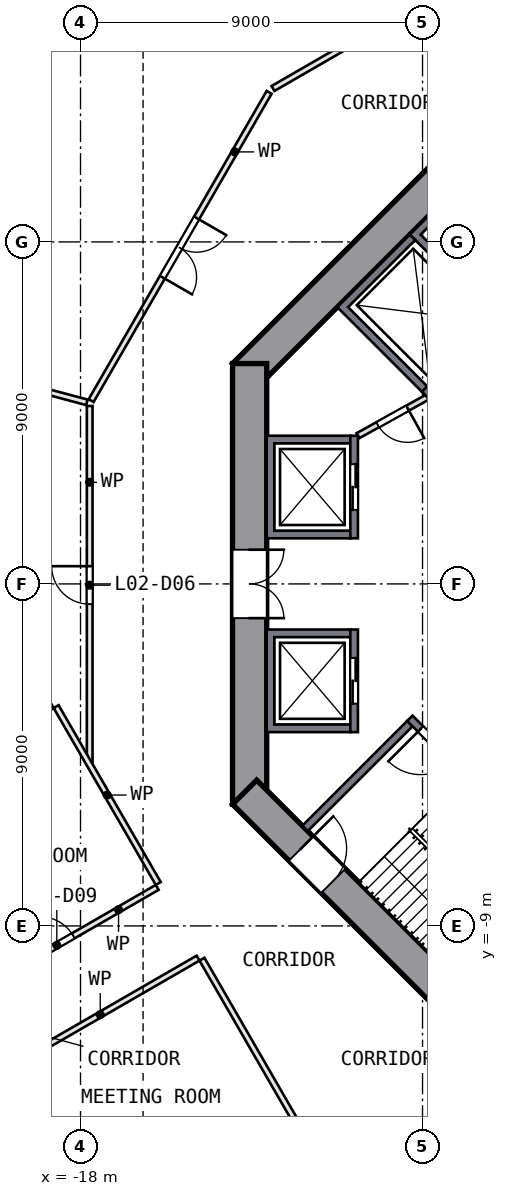
"""IFC4 building model, lengths in metres.
Left out: names, types, materials, properties, quantities, classifications, styles, units other than length and angle.
Written with IfcOpenShell. Run it as: python <this file> out.ifc"""

import sys

from ifc_helpers import new_model, si_unit, direction, frame, frame_2d, origin, place, context, subcontext, project, spatial, polyline, rectangle, outline, extrude, element, fill, save


model = new_model("IFC4")
c1 = context("Model", 3, precision=1e-05, world=origin(), true_north=direction((0.0, 1.0)))
c2 = subcontext(c1, "Body", "Model", "MODEL_VIEW")
j1 = project(units=[si_unit("LENGTHUNIT", "METRE"), si_unit("PLANEANGLEUNIT", "RADIAN")], contexts=[c1])
p1 = place(None, origin())
s1 = spatial("IfcSite", under=j1, at=p1, CompositionType="ELEMENT")
p2 = place(p1, origin())
s2 = spatial("IfcBuilding", under=s1, at=p2, CompositionType="ELEMENT")
p3 = place(p2, frame((0.0, 0.0, 14.0)))
s3 = spatial("IfcBuildingStorey", under=s2, at=p3, CompositionType="ELEMENT", Elevation=14.0)
p4 = place(p3, frame((-5.481, 13.682, 0.0), z_axis=(0.0, 0.0, 1.0), x_axis=(-0.707106781, -0.707106781, 0.0)))
e1 = element("IfcWall", 1, at=p4, inside=s3, PredefinedType="SHEAR", context=c2, shape_type="SweptSolid", body=[
    extrude(rectangle(XDim=11.598, YDim=0.9, at=frame_2d((5.799, 0.0))), origin(), (0.0, 0.0, 1.0), 5.0),
])
p5 = place(p3, frame((-13.55, 5.799, 0.0), z_axis=(0.0, 0.0, 1.0), x_axis=(0.0, -1.0, 0.0)))
e2 = element("IfcWall", 2, at=p5, inside=s3, PredefinedType="SHEAR", context=c2, shape_type="SweptSolid", body=[
    extrude(rectangle(XDim=11.598, YDim=0.9, at=frame_2d((5.799, 0.0))), origin(), (0.0, 0.0, 1.0), 5.0),
])
p6 = place(p5, frame((4.899, 0.0, 0.0)))
e3 = element("IfcOpeningElement", 3, at=p6, cuts=e2, PredefinedType="OPENING", context=c2, shape_type="SweptSolid", body=[
    extrude(rectangle(XDim=1.8, YDim=2.1, at=frame_2d((0.9, 1.05))), frame((0.0, 0.46, 0.0), z_axis=(0.0, -1.0, 0.0), x_axis=(1.0, 0.0, 0.0)), (0.0, 0.0, 1.0), 0.92),
])
p7 = place(p3, frame((-13.682, -5.481, 0.0), z_axis=(0.0, 0.0, 1.0), x_axis=(0.707106781, -0.707106781, 0.0)))
e4 = element("IfcWall", 4, at=p7, inside=s3, PredefinedType="SHEAR", context=c2, shape_type="SweptSolid", body=[
    extrude(rectangle(XDim=11.598, YDim=0.9, at=frame_2d((5.799, 0.0))), origin(), (0.0, 0.0, 1.0), 5.0),
])
p8 = place(p7, frame((2.099, 0.0, 0.0)))
e5 = element("IfcOpeningElement", 5, at=p8, cuts=e4, PredefinedType="OPENING", context=c2, shape_type="SweptSolid", body=[
    extrude(rectangle(XDim=1.2, YDim=2.1, at=frame_2d((0.6, 1.05))), frame((0.0, 0.46, 0.0), z_axis=(0.0, -1.0, 0.0), x_axis=(1.0, 0.0, 0.0)), (0.0, 0.0, 1.0), 0.92),
])
p9 = place(p3, frame((-17.777, 17.586, 0.0), z_axis=(0.0, 0.0, 1.0), x_axis=(-0.500006139, -0.866021859, 0.0)))
e6 = element("IfcWall", 6, at=p9, inside=s3, PredefinedType="SOLIDWALL", context=c2, shape_type="SweptSolid", body=[
    extrude(rectangle(XDim=12.962, YDim=0.14, at=frame_2d((6.481, 0.0))), origin(), (0.0, 0.0, 1.0), 4.55),
])
p10 = place(p9, frame((1.748, 0.0, 0.9)))
e7 = element("IfcOpeningElement", 7, at=p10, cuts=e6, PredefinedType="OPENING", context=c2, shape_type="SweptSolid", body=[
    extrude(rectangle(XDim=3.0, YDim=2.7, at=frame_2d((1.5, 1.35))), frame((0.0, 0.08, 0.0), z_axis=(0.0, -1.0, 0.0), x_axis=(1.0, 0.0, 0.0)), (0.0, 0.0, 1.0), 0.16),
])
p11 = place(p9, frame((7.935, 0.0, 0.9)))
e8 = element("IfcOpeningElement", 8, at=p11, cuts=e6, PredefinedType="OPENING", context=c2, shape_type="SweptSolid", body=[
    extrude(rectangle(XDim=3.0, YDim=2.7, at=frame_2d((1.5, 1.35))), frame((0.0, 0.08, 0.0), z_axis=(0.0, -1.0, 0.0), x_axis=(1.0, 0.0, 0.0)), (0.0, 0.0, 1.0), 0.16),
])
p12 = place(p3, origin())
e9 = element("IfcWall", 9, at=p12, inside=s3, PredefinedType="SOLIDWALL", context=c2, shape_type="SweptSolid", body=[
    extrude(outline(polyline([(-13.1, 3.9), (-10.9, 3.9), (-10.9, 3.7), (-12.9, 3.7), (-12.9, 1.4), (-10.9, 1.4), (-10.9, 1.2), (-13.1, 1.2), (-13.1, 3.9)])), origin(), (0.0, 0.0, 1.0), 4.55),
])
p13 = place(p3, frame((-10.8, 1.2, 0.0), z_axis=(0.0, 0.0, 1.0), x_axis=(0.0, 1.0, 0.0)))
e10 = element("IfcWall", 10, at=p13, inside=s3, PredefinedType="SOLIDWALL", context=c2, shape_type="SweptSolid", body=[
    extrude(rectangle(XDim=2.7, YDim=0.2, at=frame_2d((1.35, 0.0))), origin(), (0.0, 0.0, 1.0), 4.55),
])
p14 = place(p13, frame((0.75, 0.0, 0.0)))
e11 = element("IfcOpeningElement", 11, at=p14, cuts=e10, PredefinedType="OPENING", context=c2, shape_type="SweptSolid", body=[
    extrude(rectangle(XDim=1.2, YDim=2.1, at=frame_2d((0.6, 1.05))), frame((0.0, 0.11, 0.0), z_axis=(0.0, -1.0, 0.0), x_axis=(1.0, 0.0, 0.0)), (0.0, 0.0, 1.0), 0.22),
])
p15 = place(p3, origin())
e12 = element("IfcWall", 12, at=p15, inside=s3, PredefinedType="SOLIDWALL", context=c2, shape_type="SweptSolid", body=[
    extrude(outline(polyline([(-13.1, -3.9), (-13.1, -1.2), (-10.9, -1.2), (-10.9, -1.4), (-12.9, -1.4), (-12.9, -3.7), (-10.9, -3.7), (-10.9, -3.9), (-13.1, -3.9)])), origin(), (0.0, 0.0, 1.0), 4.55),
])
p16 = place(p3, frame((-10.8, -1.2, 0.0), z_axis=(0.0, 0.0, 1.0), x_axis=(0.0, -1.0, 0.0)))
e13 = element("IfcWall", 13, at=p16, inside=s3, PredefinedType="SOLIDWALL", context=c2, shape_type="SweptSolid", body=[
    extrude(rectangle(XDim=2.7, YDim=0.2, at=frame_2d((1.35, 0.0))), origin(), (0.0, 0.0, 1.0), 4.55),
])
p17 = place(p16, frame((0.75, 0.0, 0.0)))
e14 = element("IfcOpeningElement", 14, at=p17, cuts=e13, PredefinedType="OPENING", context=c2, shape_type="SweptSolid", body=[
    extrude(rectangle(XDim=1.2, YDim=2.1, at=frame_2d((0.6, 1.05))), frame((0.0, 0.11, 0.0), z_axis=(0.0, -1.0, 0.0), x_axis=(1.0, 0.0, 0.0)), (0.0, 0.0, 1.0), 0.22),
])
p18 = place(p3, origin())
e15 = element("IfcWall", 15, at=p18, inside=s3, PredefinedType="SOLIDWALL", context=c2, shape_type="SweptSolid", body=[
    extrude(outline(polyline([(-9.334, 9.192), (-7.283, 11.243), (-5.056, 9.016), (-5.197, 8.874), (-7.283, 10.96), (-9.051, 9.192), (-6.965, 7.106), (-7.106, 6.965), (-9.334, 9.192)])), origin(), (0.0, 0.0, 1.0), 4.55),
])
p19 = place(p3, origin())
e16 = element("IfcWall", 16, at=p19, inside=s3, PredefinedType="SOLIDWALL", context=c2, shape_type="SweptSolid", body=[
    extrude(outline(polyline([(-11.243, 7.283), (-9.334, 9.192), (-9.192, 9.051), (-10.96, 7.283), (-8.874, 5.197), (-9.016, 5.056), (-11.243, 7.283)])), origin(), (0.0, 0.0, 1.0), 4.55),
])
p20 = place(p3, frame((-7.036, 6.894, 0.0), z_axis=(0.0, 0.0, 1.0), x_axis=(-0.707106781, -0.707106781, 0.0)))
e17 = element("IfcWall", 17, at=p20, inside=s3, PredefinedType="SOLIDWALL", context=c2, shape_type="SweptSolid", body=[
    extrude(rectangle(XDim=2.7, YDim=0.2, at=frame_2d((1.35, 0.0))), origin(), (0.0, 0.0, 1.0), 4.55),
])
p21 = place(p20, frame((0.65, 0.0, 0.0)))
e18 = element("IfcOpeningElement", 18, at=p21, cuts=e17, PredefinedType="OPENING", context=c2, shape_type="SweptSolid", body=[
    extrude(rectangle(XDim=1.2, YDim=2.1, at=frame_2d((0.6, 1.05))), frame((0.0, 0.11, 0.0), z_axis=(0.0, -1.0, 0.0), x_axis=(1.0, 0.0, 0.0)), (0.0, 0.0, 1.0), 0.22),
])
p22 = place(p3, frame((-3.535, -9.334, 0.0), z_axis=(0.0, 0.0, 1.0), x_axis=(-0.707106781, 0.707106781, 0.0)))
e19 = element("IfcWall", 19, at=p22, inside=s3, PredefinedType="SOLIDWALL", context=c2, shape_type="SweptSolid", body=[
    extrude(rectangle(XDim=8.2, YDim=0.2, at=frame_2d((4.1, 0.0))), origin(), (0.0, 0.0, 1.0), 4.55),
])
p23 = place(p22, frame((6.6, 0.0, 0.0)))
e20 = element("IfcOpeningElement", 20, at=p23, cuts=e19, PredefinedType="OPENING", context=c2, shape_type="SweptSolid", body=[
    extrude(rectangle(XDim=1.2, YDim=2.1, at=frame_2d((0.6, 1.05))), frame((0.0, 0.11, 0.0), z_axis=(0.0, -1.0, 0.0), x_axis=(1.0, 0.0, 0.0)), (0.0, 0.0, 1.0), 0.22),
])
p24 = place(p3, frame((-9.334, -3.677, 0.0), z_axis=(0.0, 0.0, 1.0), x_axis=(-0.707106781, -0.707106781, 0.0)))
e21 = element("IfcWall", 21, at=p24, inside=s3, PredefinedType="SOLIDWALL", context=c2, shape_type="SweptSolid", body=[
    extrude(rectangle(XDim=3.9, YDim=0.2, at=frame_2d((1.95, 0.0))), origin(), (0.0, 0.0, 1.0), 4.55),
])
p25 = place(p3, frame((-8.874, 4.914, 0.0), z_axis=(0.0, 0.0, 1.0), x_axis=(-0.874129705, -0.485692555, 0.0)))
e22 = element("IfcWall", 22, at=p25, inside=s3, PredefinedType="PARTITIONING", context=c2, shape_type="SweptSolid", body=[
    extrude(rectangle(XDim=2.089, YDim=0.15, at=frame_2d((1.044, 0.0))), origin(), (0.0, 0.0, 1.0), 4.55),
])
p26 = place(p25, frame((0.594, 0.0, 0.0)))
e23 = element("IfcOpeningElement", 23, at=p26, cuts=e22, PredefinedType="OPENING", context=c2, shape_type="SweptSolid", body=[
    extrude(rectangle(XDim=0.9, YDim=2.1, at=frame_2d((0.45, 1.05))), frame((0.0, 0.085, 0.0), z_axis=(0.0, -1.0, 0.0), x_axis=(1.0, 0.0, 0.0)), (0.0, 0.0, 1.0), 0.17),
])
p27 = place(p3, frame((-22.965, 6.153, 0.0), z_axis=(0.0, 0.0, 1.0), x_axis=(0.965919345, -0.258843233, 0.0)))
e24 = element("IfcWall", 24, at=p27, inside=s3, PredefinedType="PARTITIONING", context=c2, shape_type="SweptSolid", body=[
    extrude(rectangle(XDim=5.315, YDim=0.15, at=frame_2d((2.657, 0.0))), origin(), (0.0, 0.0, 1.0), 4.55),
])
p28 = place(p3, frame((-20.055, -12.82, 0.0), z_axis=(0.0, 0.0, 1.0), x_axis=(0.866038559, 0.499977214, 0.0)))
e25 = element("IfcWall", 25, at=p28, inside=s3, PredefinedType="PARTITIONING", context=c2, shape_type="SweptSolid", body=[
    extrude(rectangle(XDim=5.945, YDim=0.15, at=frame_2d((2.973, 0.0))), origin(), (0.0, 0.0, 1.0), 4.55),
])
p29 = place(p3, frame((-20.045, -13.802, 0.0), z_axis=(0.0, 0.0, 1.0), x_axis=(0.500027049, -0.866009787, 0.0)))
e26 = element("IfcWall", 26, at=p29, inside=s3, PredefinedType="PARTITIONING", context=c2, shape_type="SweptSolid", body=[
    extrude(rectangle(XDim=3.215, YDim=0.15, at=frame_2d((1.607, 0.0))), origin(), (0.0, 0.0, 1.0), 4.55),
])
p30 = place(p3, frame((-18.744, -3.201, 0.0), z_axis=(0.0, 0.0, 1.0), x_axis=(-0.866027538, -0.499996304, 0.0)))
e27 = element("IfcWall", 27, at=p30, inside=s3, PredefinedType="PARTITIONING", context=c2, shape_type="SweptSolid", body=[
    extrude(rectangle(XDim=5.582, YDim=0.15, at=frame_2d((2.791, 0.0))), origin(), (0.0, 0.0, 1.0), 4.55),
])
p31 = place(p3, frame((-17.758, -4.683, 0.0), z_axis=(0.0, 0.0, 1.0), x_axis=(0.0, 1.0, 0.0)))
e28 = element("IfcWall", 28, at=p31, inside=s3, PredefinedType="PARTITIONING", context=c2, shape_type="SweptSolid", body=[
    extrude(rectangle(XDim=9.367, YDim=0.15, at=frame_2d((4.683, 0.0))), origin(), (0.0, 0.0, 1.0), 4.55),
])
p32 = place(p31, frame((4.15, 0.0, 0.0)))
e29 = element("IfcOpeningElement", 29, at=p32, cuts=e28, PredefinedType="OPENING", context=c2, shape_type="SweptSolid", body=[
    extrude(rectangle(XDim=1.0, YDim=2.1, at=frame_2d((0.5, 1.05))), frame((0.0, 0.085, 0.0), z_axis=(0.0, -1.0, 0.0), x_axis=(1.0, 0.0, 0.0)), (0.0, 0.0, 1.0), 0.17),
])
p33 = place(p3, frame((-13.038, 12.935, 0.0), z_axis=(0.0, 0.0, 1.0), x_axis=(-0.499979668, -0.866037142, 0.0)))
e30 = element("IfcWall", 30, at=p33, inside=s3, PredefinedType="PARTITIONING", context=c2, shape_type="SweptSolid", body=[
    extrude(rectangle(XDim=9.367, YDim=0.15, at=frame_2d((4.683, 0.0))), origin(), (0.0, 0.0, 1.0), 4.55),
])
p34 = place(p33, frame((3.817, 0.0, 0.0)))
e31 = element("IfcOpeningElement", 31, at=p34, cuts=e30, PredefinedType="OPENING", context=c2, shape_type="SweptSolid", body=[
    extrude(rectangle(XDim=1.8, YDim=2.1, at=frame_2d((0.9, 1.05))), frame((0.0, 0.085, 0.0), z_axis=(0.0, -1.0, 0.0), x_axis=(1.0, 0.0, 0.0)), (0.0, 0.0, 1.0), 0.17),
])
p35 = place(p3, frame((-21.13, -10.958, 0.0), z_axis=(0.0, 0.0, 1.0), x_axis=(0.86601051, 0.500025795, 0.0)))
e32 = element("IfcWall", 32, at=p35, inside=s3, PredefinedType="PARTITIONING", context=c2, shape_type="SweptSolid", body=[
    extrude(rectangle(XDim=5.945, YDim=0.15, at=frame_2d((2.973, 0.0))), origin(), (0.0, 0.0, 1.0), 4.55),
])
p36 = place(p35, frame((2.395, 0.0, 0.0)))
e33 = element("IfcOpeningElement", 33, at=p36, cuts=e32, PredefinedType="OPENING", context=c2, shape_type="SweptSolid", body=[
    extrude(rectangle(XDim=1.0, YDim=2.1, at=frame_2d((0.5, 1.05))), frame((0.0, 0.085, 0.0), z_axis=(0.0, -1.0, 0.0), x_axis=(1.0, 0.0, 0.0)), (0.0, 0.0, 1.0), 0.17),
])
p37 = place(p3, frame((-15.954, -7.883, 0.0), z_axis=(0.0, 0.0, 1.0), x_axis=(-0.4999885, 0.866032043, 0.0)))
e34 = element("IfcWall", 34, at=p37, inside=s3, PredefinedType="PARTITIONING", context=c2, shape_type="SweptSolid", body=[
    extrude(rectangle(XDim=5.375, YDim=0.15, at=frame_2d((2.688, 0.0))), origin(), (0.0, 0.0, 1.0), 4.55),
])
p38 = place(p3, frame((-4.823, 17.721, 0.0), z_axis=(0.0, 0.0, 1.0), x_axis=(-0.866037142, -0.499979668, 0.0)))
e35 = element("IfcWall", 35, at=p38, inside=s3, PredefinedType="PARTITIONING", context=c2, shape_type="SweptSolid", body=[
    extrude(rectangle(XDim=9.367, YDim=0.15, at=frame_2d((4.683, 0.0))), origin(), (0.0, 0.0, 1.0), 4.55),
])
p39 = place(p38, frame((3.817, 0.0, 0.0)))
e36 = element("IfcOpeningElement", 36, at=p39, cuts=e35, PredefinedType="OPENING", context=c2, shape_type="SweptSolid", body=[
    extrude(rectangle(XDim=1.8, YDim=2.1, at=frame_2d((0.9, 1.05))), frame((0.0, 0.085, 0.0), z_axis=(0.0, -1.0, 0.0), x_axis=(1.0, 0.0, 0.0)), (0.0, 0.0, 1.0), 0.17),
])
p40 = place(p3, frame((-12.117, -14.53, 0.0), z_axis=(0.0, 0.0, 1.0), x_axis=(-0.4999885, 0.866032043, 0.0)))
e37 = element("IfcWall", 37, at=p40, inside=s3, PredefinedType="PARTITIONING", context=c2, shape_type="SweptSolid", body=[
    extrude(rectangle(XDim=5.375, YDim=0.15, at=frame_2d((2.688, 0.0))), origin(), (0.0, 0.0, 1.0), 4.55),
])
p41 = place(p10, origin())
e38 = element("IfcWindow", 38, at=p41, inside=s3, PartitioningType="SINGLE_PANEL", PredefinedType="WINDOW", context=c2, shape_type="SweptSolid", body=[
    extrude(rectangle(XDim=3.0, YDim=2.7, at=frame_2d((1.5, 1.35))), frame((0.0, 0.03, 0.0), z_axis=(0.0, -1.0, 0.0), x_axis=(1.0, 0.0, 0.0)), (0.0, 0.0, 1.0), 0.06),
])
fill(e7, e38)
p42 = place(p14, origin())
e39 = element("IfcDoor", 39, at=p42, inside=s3, OperationType="DOUBLE_DOOR_SLIDING", PredefinedType="DOOR", context=c2, shape_type="SweptSolid", body=[
    extrude(rectangle(XDim=1.2, YDim=2.1, at=frame_2d((0.6, 1.05))), frame((0.0, 0.025, 0.0), z_axis=(0.0, -1.0, 0.0), x_axis=(1.0, 0.0, 0.0)), (0.0, 0.0, 1.0), 0.05),
])
fill(e11, e39)
p43 = place(p17, origin())
e40 = element("IfcDoor", 40, at=p43, inside=s3, OperationType="DOUBLE_DOOR_SLIDING", PredefinedType="DOOR", context=c2, shape_type="SweptSolid", body=[
    extrude(rectangle(XDim=1.2, YDim=2.1, at=frame_2d((0.6, 1.05))), frame((0.0, 0.025, 0.0), z_axis=(0.0, -1.0, 0.0), x_axis=(1.0, 0.0, 0.0)), (0.0, 0.0, 1.0), 0.05),
])
fill(e14, e40)
p44 = place(p23, origin())
e41 = element("IfcDoor", 41, at=p44, inside=s3, OperationType="SINGLE_SWING_RIGHT", PredefinedType="DOOR", context=c2, shape_type="SweptSolid", body=[
    extrude(rectangle(XDim=1.2, YDim=2.1, at=frame_2d((0.6, 1.05))), frame((0.0, 0.025, 0.0), z_axis=(0.0, -1.0, 0.0), x_axis=(1.0, 0.0, 0.0)), (0.0, 0.0, 1.0), 0.05),
])
fill(e20, e41)
p45 = place(p6, origin())
e42 = element("IfcDoor", 42, at=p45, inside=s3, OperationType="DOUBLE_DOOR_SINGLE_SWING", PredefinedType="DOOR", context=c2, shape_type="SweptSolid", body=[
    extrude(rectangle(XDim=1.8, YDim=2.1, at=frame_2d((0.9, 1.05))), frame((0.0, 0.025, 0.0), z_axis=(0.0, -1.0, 0.0), x_axis=(1.0, 0.0, 0.0)), (0.0, 0.0, 1.0), 0.05),
])
fill(e3, e42)
p46 = place(p8, origin())
e43 = element("IfcDoor", 43, at=p46, inside=s3, OperationType="SINGLE_SWING_LEFT", PredefinedType="DOOR", context=c2, shape_type="SweptSolid", body=[
    extrude(rectangle(XDim=1.2, YDim=2.1, at=frame_2d((0.6, 1.05))), frame((0.0, 0.025, 0.0), z_axis=(0.0, -1.0, 0.0), x_axis=(1.0, 0.0, 0.0)), (0.0, 0.0, 1.0), 0.05),
])
fill(e5, e43)
p47 = place(p26, origin())
e44 = element("IfcDoor", 44, at=p47, inside=s3, OperationType="SINGLE_SWING_LEFT", PredefinedType="DOOR", context=c2, shape_type="SweptSolid", body=[
    extrude(rectangle(XDim=0.9, YDim=2.1, at=frame_2d((0.45, 1.05))), frame((0.0, 0.025, 0.0), z_axis=(0.0, -1.0, 0.0), x_axis=(1.0, 0.0, 0.0)), (0.0, 0.0, 1.0), 0.05),
])
fill(e23, e44)
p48 = place(p32, origin())
e45 = element("IfcDoor", 45, at=p48, inside=s3, OperationType="SINGLE_SWING_RIGHT", PredefinedType="DOOR", context=c2, shape_type="SweptSolid", body=[
    extrude(rectangle(XDim=1.0, YDim=2.1, at=frame_2d((0.5, 1.05))), frame((0.0, 0.025, 0.0), z_axis=(0.0, -1.0, 0.0), x_axis=(1.0, 0.0, 0.0)), (0.0, 0.0, 1.0), 0.05),
])
fill(e29, e45)
p49 = place(p34, origin())
e46 = element("IfcDoor", 46, at=p49, inside=s3, OperationType="DOUBLE_DOOR_SINGLE_SWING", PredefinedType="DOOR", context=c2, shape_type="SweptSolid", body=[
    extrude(rectangle(XDim=1.8, YDim=2.1, at=frame_2d((0.9, 1.05))), frame((0.0, 0.025, 0.0), z_axis=(0.0, -1.0, 0.0), x_axis=(1.0, 0.0, 0.0)), (0.0, 0.0, 1.0), 0.05),
])
fill(e31, e46)
p50 = place(p36, origin())
e47 = element("IfcDoor", 47, at=p50, inside=s3, OperationType="SINGLE_SWING_LEFT", PredefinedType="DOOR", context=c2, shape_type="SweptSolid", body=[
    extrude(rectangle(XDim=1.0, YDim=2.1, at=frame_2d((0.5, 1.05))), frame((0.0, 0.025, 0.0), z_axis=(0.0, -1.0, 0.0), x_axis=(1.0, 0.0, 0.0)), (0.0, 0.0, 1.0), 0.05),
])
fill(e33, e47)
save(model, sys.argv[1])
